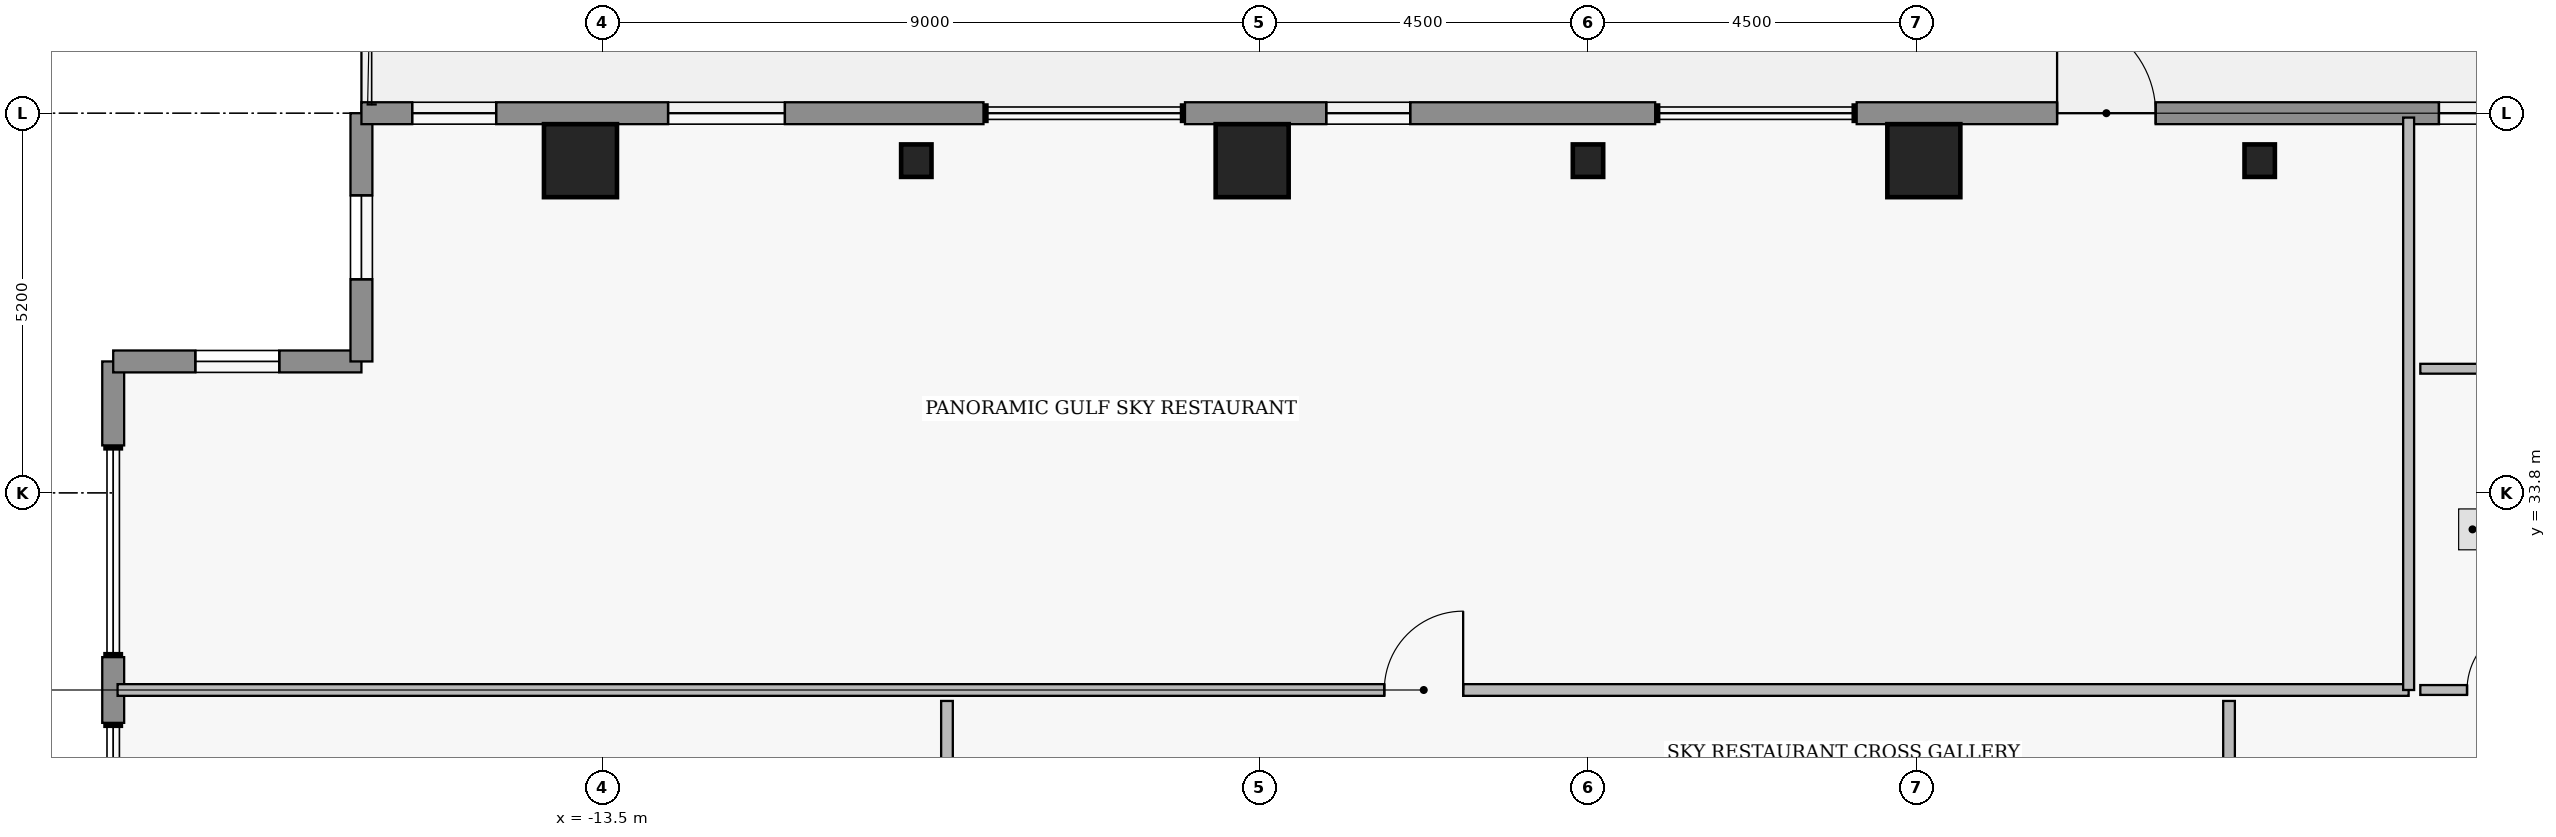
"""IFC4 building model, lengths in metres.
Left out: names, types, materials, properties, quantities, classifications, styles, units other than length and angle.
Written with IfcOpenShell. Run it as: python <this file> out.ifc"""

import sys

from ifc_helpers import new_model, si_unit, direction, frame, frame_2d, origin, origin_2d, place, context, subcontext, project, spatial, rectangle, i_section, extrude, element, fill, save


model = new_model("IFC4")
c1 = context("Model", 3, precision=1e-05, world=origin(), true_north=direction((0.0, 1.0)))
c2 = subcontext(c1, "Body", "Model", "MODEL_VIEW")
j1 = project(units=[si_unit("LENGTHUNIT", "METRE"), si_unit("PLANEANGLEUNIT", "RADIAN")], contexts=[c1])
p1 = place(None, origin())
s1 = spatial("IfcSite", under=j1, at=p1, CompositionType="ELEMENT")
p2 = place(p1, origin())
s2 = spatial("IfcBuilding", under=s1, at=p2, CompositionType="ELEMENT")
p3 = place(p2, frame((0.0, 0.0, 284.05)))
s3 = spatial("IfcBuildingStorey", under=s2, at=p3, CompositionType="ELEMENT", Elevation=284.05)
for number, where, z_axis, x_axis in (
    (1, (-13.8, 38.35, 0.0), (0.0, 0.0, 1.0), (1.0, 0.0, 0.0)),
    (2, (-4.6, 38.35, 0.0), (0.0, 0.0, 1.0), (1.0, 0.0, 0.0)),
    (3, (4.6, 38.35, 0.0), (0.0, 0.0, 1.0), (1.0, 0.0, 0.0)),
):
    element("IfcColumn", number, at=place(p3, frame(where, z_axis=z_axis, x_axis=x_axis)), inside=s3, PredefinedType="COLUMN", context=c2, shape_type="SweptSolid", body=[
        extrude(rectangle(XDim=1.0, YDim=1.0, at=origin_2d()), origin(), (0.0, 0.0, 1.0), 4.4),
    ])
for number, where, z_axis, x_axis in (
    (4, (-9.2, 38.35, -0.22), (0.0, 0.0, 1.0), (1.0, 0.0, 0.0)),
    (5, (0.0, 38.35, -0.22), (0.0, 0.0, 1.0), (1.0, 0.0, 0.0)),
    (6, (9.2, 38.35, -0.22), (0.0, 0.0, 1.0), (1.0, 0.0, 0.0)),
):
    element("IfcColumn", number, at=place(p3, frame(where, z_axis=z_axis, x_axis=x_axis)), inside=s3, PredefinedType="PILASTER", context=c2, shape_type="SweptSolid", body=[
        extrude(i_section(OverallWidth=0.416, OverallDepth=0.445, WebThickness=0.039, FlangeThickness=0.063, at=origin_2d()), origin(), (0.0, 0.0, 1.0), 3.5),
    ])
p4 = place(p3, frame((-20.2, 30.65, 0.0), z_axis=(0.0, 0.0, 1.0), x_axis=(0.0, 1.0, 0.0)))
e7 = element("IfcWall", 7, at=p4, inside=s3, PredefinedType="STANDARD", context=c2, shape_type="SweptSolid", body=[
    extrude(rectangle(XDim=0.9, YDim=0.3, at=frame_2d((0.45, 0.0))), origin(), (0.0, 0.0, 1.0), 4.18),
])
p5 = place(p3, frame((-20.2, 34.45, 0.0), z_axis=(0.0, 0.0, 1.0), x_axis=(0.0, 1.0, 0.0)))
e8 = element("IfcWall", 8, at=p5, inside=s3, PredefinedType="STANDARD", context=c2, shape_type="SweptSolid", body=[
    extrude(rectangle(XDim=1.15, YDim=0.3, at=frame_2d((0.575, 0.0))), origin(), (0.0, 0.0, 1.0), 4.18),
])
p6 = place(p3, frame((-20.2, 35.6, 0.0), z_axis=(0.0, 0.0, 1.0), x_axis=(1.0, 0.0, 0.0)))
e9 = element("IfcWall", 9, at=p6, inside=s3, PredefinedType="STANDARD", context=c2, shape_type="SweptSolid", body=[
    extrude(rectangle(XDim=3.4, YDim=0.3, at=frame_2d((1.7, 0.0))), origin(), (0.0, 0.0, 1.0), 4.18),
])
p7 = place(p6, frame((1.125, 0.0, 1.25)))
e10 = element("IfcOpeningElement", 10, at=p7, cuts=e9, PredefinedType="OPENING", context=c2, shape_type="SweptSolid", body=[
    extrude(rectangle(XDim=1.15, YDim=1.55, at=frame_2d((0.575, 0.775))), frame((0.0, 0.16, 0.0), z_axis=(0.0, -1.0, 0.0), x_axis=(1.0, 0.0, 0.0)), (0.0, 0.0, 1.0), 0.32),
])
p8 = place(p3, frame((-16.8, 35.6, 0.0), z_axis=(0.0, 0.0, 1.0), x_axis=(0.0, 1.0, 0.0)))
e11 = element("IfcWall", 11, at=p8, inside=s3, PredefinedType="STANDARD", context=c2, shape_type="SweptSolid", body=[
    extrude(rectangle(XDim=3.4, YDim=0.3, at=frame_2d((1.7, 0.0))), origin(), (0.0, 0.0, 1.0), 4.18),
])
p9 = place(p8, frame((1.125, 0.0, 1.25)))
e12 = element("IfcOpeningElement", 12, at=p9, cuts=e11, PredefinedType="OPENING", context=c2, shape_type="SweptSolid", body=[
    extrude(rectangle(XDim=1.15, YDim=1.55, at=frame_2d((0.575, 0.775))), frame((0.0, 0.16, 0.0), z_axis=(0.0, -1.0, 0.0), x_axis=(1.0, 0.0, 0.0)), (0.0, 0.0, 1.0), 0.32),
])
p10 = place(p3, frame((-16.8, 39.0, 0.0), z_axis=(0.0, 0.0, 1.0), x_axis=(1.0, 0.0, 0.0)))
e13 = element("IfcWall", 13, at=p10, inside=s3, PredefinedType="STANDARD", context=c2, shape_type="SweptSolid", body=[
    extrude(rectangle(XDim=8.52, YDim=0.3, at=frame_2d((4.26, 0.0))), origin(), (0.0, 0.0, 1.0), 4.18),
])
p11 = place(p10, frame((4.2, 0.0, 0.85)))
e14 = element("IfcOpeningElement", 14, at=p11, cuts=e13, PredefinedType="OPENING", context=c2, shape_type="SweptSolid", body=[
    extrude(rectangle(XDim=1.6, YDim=1.8, at=frame_2d((0.8, 0.9))), frame((0.0, 0.16, 0.0), z_axis=(0.0, -1.0, 0.0), x_axis=(1.0, 0.0, 0.0)), (0.0, 0.0, 1.0), 0.32),
])
p12 = place(p10, frame((0.695, 0.0, 0.95)))
e15 = element("IfcOpeningElement", 15, at=p12, cuts=e13, PredefinedType="OPENING", context=c2, shape_type="SweptSolid", body=[
    extrude(rectangle(XDim=1.15, YDim=1.55, at=frame_2d((0.575, 0.775))), frame((0.0, 0.16, 0.0), z_axis=(0.0, -1.0, 0.0), x_axis=(1.0, 0.0, 0.0)), (0.0, 0.0, 1.0), 0.32),
])
p13 = place(p3, frame((-5.52, 39.0, 0.0), z_axis=(0.0, 0.0, 1.0), x_axis=(1.0, 0.0, 0.0)))
e16 = element("IfcWall", 16, at=p13, inside=s3, PredefinedType="STANDARD", context=c2, shape_type="SweptSolid", body=[
    extrude(rectangle(XDim=6.44, YDim=0.3, at=frame_2d((3.22, 0.0))), origin(), (0.0, 0.0, 1.0), 4.18),
])
p14 = place(p13, frame((1.935, 0.0, 0.95)))
e17 = element("IfcOpeningElement", 17, at=p14, cuts=e16, PredefinedType="OPENING", context=c2, shape_type="SweptSolid", body=[
    extrude(rectangle(XDim=1.15, YDim=1.55, at=frame_2d((0.575, 0.775))), frame((0.0, 0.16, 0.0), z_axis=(0.0, -1.0, 0.0), x_axis=(1.0, 0.0, 0.0)), (0.0, 0.0, 1.0), 0.32),
])
p15 = place(p3, frame((3.68, 39.0, 0.0), z_axis=(0.0, 0.0, 1.0), x_axis=(1.0, 0.0, 0.0)))
e18 = element("IfcWall", 18, at=p15, inside=s3, PredefinedType="STANDARD", context=c2, shape_type="SweptSolid", body=[
    extrude(rectangle(XDim=13.12, YDim=0.3, at=frame_2d((6.56, 0.0))), origin(), (0.0, 0.0, 1.0), 4.18),
])
p16 = place(p15, frame((2.745, 0.0, 0.0)))
e19 = element("IfcOpeningElement", 19, at=p16, cuts=e18, PredefinedType="OPENING", context=c2, shape_type="SweptSolid", body=[
    extrude(rectangle(XDim=1.35, YDim=2.3, at=frame_2d((0.675, 1.15))), frame((0.0, 0.16, 0.0), z_axis=(0.0, -1.0, 0.0), x_axis=(1.0, 0.0, 0.0)), (0.0, 0.0, 1.0), 0.32),
])
p17 = place(p15, frame((7.975, 0.0, 0.95)))
e20 = element("IfcOpeningElement", 20, at=p17, cuts=e18, PredefinedType="OPENING", context=c2, shape_type="SweptSolid", body=[
    extrude(rectangle(XDim=1.15, YDim=1.55, at=frame_2d((0.575, 0.775))), frame((0.0, 0.16, 0.0), z_axis=(0.0, -1.0, 0.0), x_axis=(1.0, 0.0, 0.0)), (0.0, 0.0, 1.0), 0.32),
])
p18 = place(p15, frame((11.275, 0.0, 0.95)))
e21 = element("IfcOpeningElement", 21, at=p18, cuts=e18, PredefinedType="OPENING", context=c2, shape_type="SweptSolid", body=[
    extrude(rectangle(XDim=1.15, YDim=1.55, at=frame_2d((0.575, 0.775))), frame((0.0, 0.16, 0.0), z_axis=(0.0, -1.0, 0.0), x_axis=(1.0, 0.0, 0.0)), (0.0, 0.0, 1.0), 0.32),
])
p19 = place(p3, frame((-20.14, 31.1, 0.0), z_axis=(0.0, 0.0, 1.0), x_axis=(1.0, 0.0, 0.0)))
e22 = element("IfcWall", 22, at=p19, inside=s3, PredefinedType="PARTITIONING", context=c2, shape_type="SweptSolid", body=[
    extrude(rectangle(XDim=31.38, YDim=0.16, at=frame_2d((15.69, 0.0))), origin(), (0.0, 0.0, 1.0), 4.18),
])
p20 = place(p19, frame((17.35, 0.0, 0.0)))
e23 = element("IfcOpeningElement", 23, at=p20, cuts=e22, PredefinedType="OPENING", context=c2, shape_type="SweptSolid", body=[
    extrude(rectangle(XDim=1.08, YDim=2.18, at=frame_2d((0.54, 1.09))), frame((0.0, 0.09, 0.0), z_axis=(0.0, -1.0, 0.0), x_axis=(1.0, 0.0, 0.0)), (0.0, 0.0, 1.0), 0.18),
])
p21 = place(p3, frame((-8.78, 16.75, 0.0), z_axis=(0.0, 0.0, 1.0), x_axis=(0.0, 1.0, 0.0)))
e24 = element("IfcWall", 24, at=p21, inside=s3, PredefinedType="PARTITIONING", context=c2, shape_type="SweptSolid", body=[
    extrude(rectangle(XDim=14.2, YDim=0.16, at=frame_2d((7.1, 0.0))), origin(), (0.0, 0.0, 1.0), 4.18),
])
p22 = place(p21, frame((6.56, 0.0, 0.0)))
e25 = element("IfcOpeningElement", 25, at=p22, cuts=e24, PredefinedType="OPENING", context=c2, shape_type="SweptSolid", body=[
    extrude(rectangle(XDim=1.08, YDim=2.18, at=frame_2d((0.54, 1.09))), frame((0.0, 0.09, 0.0), z_axis=(0.0, -1.0, 0.0), x_axis=(1.0, 0.0, 0.0)), (0.0, 0.0, 1.0), 0.18),
])
p23 = place(p3, frame((8.78, 16.75, 0.0), z_axis=(0.0, 0.0, 1.0), x_axis=(0.0, 1.0, 0.0)))
e26 = element("IfcWall", 26, at=p23, inside=s3, PredefinedType="PARTITIONING", context=c2, shape_type="SweptSolid", body=[
    extrude(rectangle(XDim=14.2, YDim=0.16, at=frame_2d((7.1, 0.0))), origin(), (0.0, 0.0, 1.0), 4.18),
])
p24 = place(p23, frame((6.56, 0.0, 0.0)))
e27 = element("IfcOpeningElement", 27, at=p24, cuts=e26, PredefinedType="OPENING", context=c2, shape_type="SweptSolid", body=[
    extrude(rectangle(XDim=1.08, YDim=2.18, at=frame_2d((0.54, 1.09))), frame((0.0, 0.09, 0.0), z_axis=(0.0, -1.0, 0.0), x_axis=(1.0, 0.0, 0.0)), (0.0, 0.0, 1.0), 0.18),
])
p25 = place(p3, frame((11.4, 31.1, 0.0), z_axis=(0.0, 0.0, 1.0), x_axis=(1.0, 0.0, 0.0)))
e28 = element("IfcWall", 28, at=p25, inside=s3, PredefinedType="PLUMBINGWALL", context=c2, shape_type="SweptSolid", body=[
    extrude(rectangle(XDim=2.2, YDim=0.135, at=frame_2d((1.1, 0.0))), origin(), (0.0, 0.0, 1.0), 4.18),
])
p26 = place(p25, frame((0.64, 0.0, 0.0)))
e29 = element("IfcOpeningElement", 29, at=p26, cuts=e28, PredefinedType="OPENING", context=c2, shape_type="SweptSolid", body=[
    extrude(rectangle(XDim=0.92, YDim=2.12, at=frame_2d((0.46, 1.06))), frame((0.0, 0.077, 0.0), z_axis=(0.0, -1.0, 0.0), x_axis=(1.0, 0.0, 0.0)), (0.0, 0.0, 1.0), 0.155),
])
p27 = place(p3, frame((11.24, 31.1, 0.0), z_axis=(0.0, 0.0, 1.0), x_axis=(0.0, 1.0, 0.0)))
e30 = element("IfcWall", 30, at=p27, inside=s3, PredefinedType="PARTITIONING", context=c2, shape_type="SweptSolid", body=[
    extrude(rectangle(XDim=7.84, YDim=0.15, at=frame_2d((3.92, 0.0))), origin(), (0.0, 0.0, 1.0), 4.18),
])
p28 = place(p3, frame((11.4, 35.5, 0.0), z_axis=(0.0, 0.0, 1.0), x_axis=(1.0, 0.0, 0.0)))
e31 = element("IfcWall", 31, at=p28, inside=s3, PredefinedType="PLUMBINGWALL", context=c2, shape_type="SweptSolid", body=[
    extrude(rectangle(XDim=4.4, YDim=0.135, at=frame_2d((2.2, 0.0))), origin(), (0.0, 0.0, 1.0), 3.776),
])
p29 = place(p7, origin())
e32 = element("IfcWindow", 32, at=p29, inside=s3, PartitioningType="SINGLE_PANEL", PredefinedType="WINDOW", context=c2, shape_type="SweptSolid", body=[
    extrude(rectangle(XDim=1.15, YDim=1.55, at=frame_2d((0.575, 0.775))), frame((0.0, 0.03, 0.0), z_axis=(0.0, -1.0, 0.0), x_axis=(1.0, 0.0, 0.0)), (0.0, 0.0, 1.0), 0.06),
])
fill(e10, e32)
p30 = place(p9, origin())
e33 = element("IfcWindow", 33, at=p30, inside=s3, PartitioningType="SINGLE_PANEL", PredefinedType="WINDOW", context=c2, shape_type="SweptSolid", body=[
    extrude(rectangle(XDim=1.15, YDim=1.55, at=frame_2d((0.575, 0.775))), frame((0.0, 0.03, 0.0), z_axis=(0.0, -1.0, 0.0), x_axis=(1.0, 0.0, 0.0)), (0.0, 0.0, 1.0), 0.06),
])
fill(e12, e33)
p31 = place(p11, origin())
e34 = element("IfcWindow", 34, at=p31, inside=s3, PartitioningType="SINGLE_PANEL", PredefinedType="WINDOW", context=c2, shape_type="SweptSolid", body=[
    extrude(rectangle(XDim=1.6, YDim=1.8, at=frame_2d((0.8, 0.9))), frame((0.0, 0.03, 0.0), z_axis=(0.0, -1.0, 0.0), x_axis=(1.0, 0.0, 0.0)), (0.0, 0.0, 1.0), 0.06),
])
fill(e14, e34)
p32 = place(p12, origin())
e35 = element("IfcWindow", 35, at=p32, inside=s3, PartitioningType="SINGLE_PANEL", PredefinedType="WINDOW", context=c2, shape_type="SweptSolid", body=[
    extrude(rectangle(XDim=1.15, YDim=1.55, at=frame_2d((0.575, 0.775))), frame((0.0, 0.03, 0.0), z_axis=(0.0, -1.0, 0.0), x_axis=(1.0, 0.0, 0.0)), (0.0, 0.0, 1.0), 0.06),
])
fill(e15, e35)
p33 = place(p14, origin())
e36 = element("IfcWindow", 36, at=p33, inside=s3, PartitioningType="SINGLE_PANEL", PredefinedType="WINDOW", context=c2, shape_type="SweptSolid", body=[
    extrude(rectangle(XDim=1.15, YDim=1.55, at=frame_2d((0.575, 0.775))), frame((0.0, 0.03, 0.0), z_axis=(0.0, -1.0, 0.0), x_axis=(1.0, 0.0, 0.0)), (0.0, 0.0, 1.0), 0.06),
])
fill(e17, e36)
p34 = place(p16, origin())
e37 = element("IfcDoor", 37, at=p34, inside=s3, OperationType="SINGLE_SWING_LEFT", PredefinedType="DOOR", context=c2, shape_type="SweptSolid", body=[
    extrude(rectangle(XDim=1.35, YDim=2.3, at=frame_2d((0.675, 1.15))), frame((0.0, 0.025, 0.0), z_axis=(0.0, -1.0, 0.0), x_axis=(1.0, 0.0, 0.0)), (0.0, 0.0, 1.0), 0.05),
])
fill(e19, e37)
p35 = place(p17, origin())
e38 = element("IfcWindow", 38, at=p35, inside=s3, PartitioningType="SINGLE_PANEL", PredefinedType="WINDOW", context=c2, shape_type="SweptSolid", body=[
    extrude(rectangle(XDim=1.15, YDim=1.55, at=frame_2d((0.575, 0.775))), frame((0.0, 0.03, 0.0), z_axis=(0.0, -1.0, 0.0), x_axis=(1.0, 0.0, 0.0)), (0.0, 0.0, 1.0), 0.06),
])
fill(e20, e38)
p36 = place(p20, origin())
e39 = element("IfcDoor", 39, at=p36, inside=s3, OperationType="SINGLE_SWING_RIGHT", PredefinedType="DOOR", context=c2, shape_type="SweptSolid", body=[
    extrude(rectangle(XDim=1.08, YDim=2.18, at=frame_2d((0.54, 1.09))), frame((0.0, 0.025, 0.0), z_axis=(0.0, -1.0, 0.0), x_axis=(1.0, 0.0, 0.0)), (0.0, 0.0, 1.0), 0.05),
])
fill(e23, e39)
p37 = place(p26, origin())
e40 = element("IfcDoor", 40, at=p37, inside=s3, OperationType="SINGLE_SWING_RIGHT", PredefinedType="DOOR", context=c2, shape_type="SweptSolid", body=[
    extrude(rectangle(XDim=0.92, YDim=2.12, at=frame_2d((0.46, 1.06))), frame((0.0, 0.025, 0.0), z_axis=(0.0, -1.0, 0.0), x_axis=(1.0, 0.0, 0.0)), (0.0, 0.0, 1.0), 0.05),
])
fill(e29, e40)
save(model, sys.argv[1])
